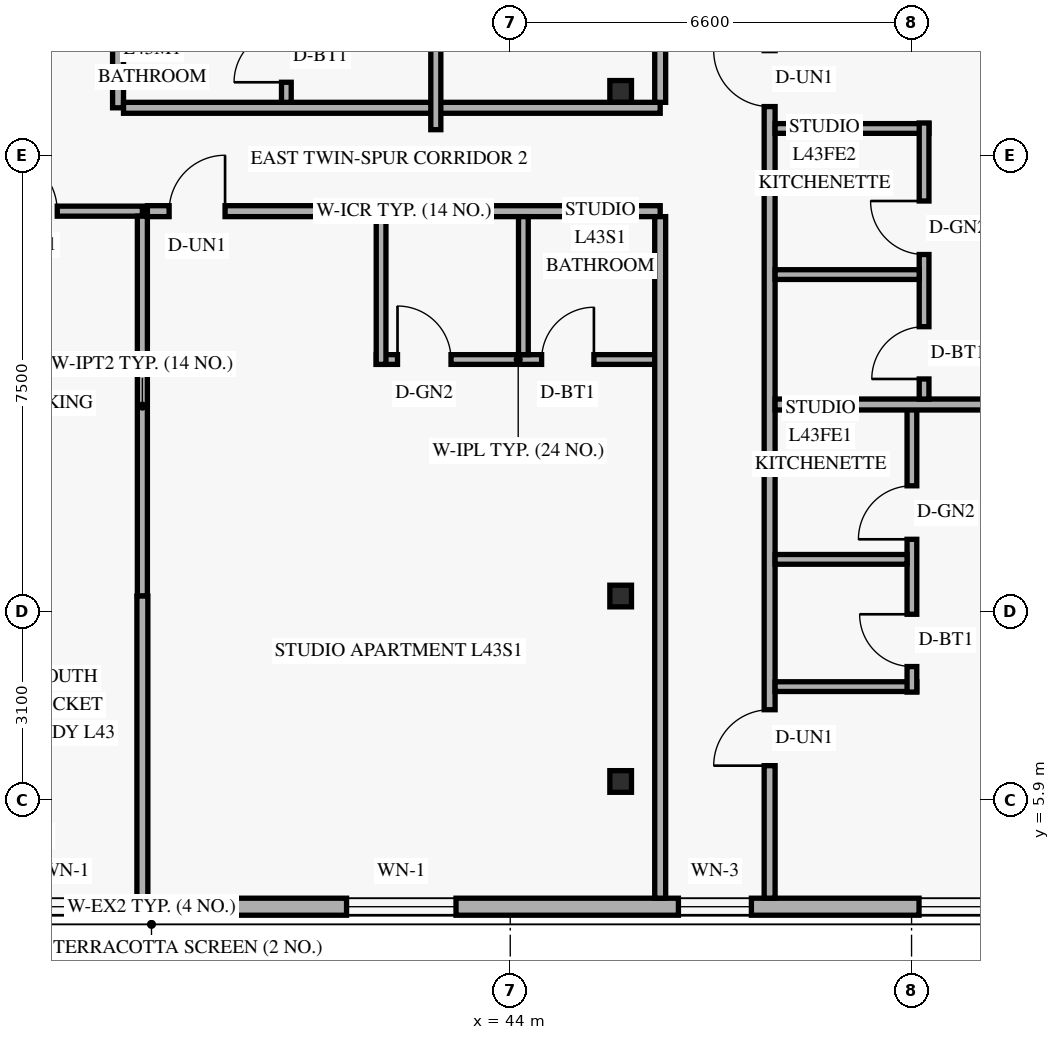
"""IFC4 building model, lengths in metres.
Left out: names, types, materials, properties, quantities, classifications, styles, units other than length and angle.
Written with IfcOpenShell. Run it as: python <this file> out.ifc"""

import sys

from ifc_helpers import new_model, si_unit, direction, frame, frame_2d, origin, origin_2d, place, context, subcontext, project, spatial, rectangle, hollow_rectangle, extrude, element, fill, save


model = new_model("IFC4")
c1 = context("Model", 3, precision=1e-05, world=origin(), true_north=direction((0.0, 1.0)))
c2 = subcontext(c1, "Body", "Model", "MODEL_VIEW")
j1 = project(units=[si_unit("LENGTHUNIT", "METRE"), si_unit("PLANEANGLEUNIT", "RADIAN")], contexts=[c1])
p1 = place(None, origin())
s1 = spatial("IfcSite", under=j1, at=p1, CompositionType="ELEMENT")
p2 = place(p1, origin())
s2 = spatial("IfcBuilding", under=s1, at=p2, CompositionType="ELEMENT")
p3 = place(p2, frame((0.0, 0.0, 166.2)))
s3 = spatial("IfcBuildingStorey", under=s2, at=p3, CompositionType="ELEMENT", Elevation=166.2)
for number, where, z_axis, x_axis in (
    (1, (45.753, 6.2, 0.0), (0.035, 0.0, 0.999), (0.0, 1.0, 0.0)),
    (2, (45.753, 9.25, 0.0), (0.035, 0.0, 0.999), (0.0, 1.0, 0.0)),
    (3, (45.753, 17.55, 0.0), (0.035, 0.0, 0.999), (0.0, 1.0, 0.0)),
):
    element("IfcColumn", number, at=place(p3, frame(where, z_axis=z_axis, x_axis=x_axis)), inside=s3, PredefinedType="COLUMN", context=c2, shape_type="SweptSolid", body=[
        extrude(hollow_rectangle(XDim=0.356, YDim=0.356, WallThickness=0.016, at=origin_2d()), origin(), (0.0, 0.0, 1.0), 3.602),
    ])
p4 = place(p3, frame((21.22, 4.14, 0.0), z_axis=(0.0, 0.0, 1.0), x_axis=(1.0, 0.0, 0.0)))
e4 = element("IfcWall", 4, at=p4, inside=s3, PredefinedType="SOLIDWALL", context=c2, shape_type="SweptSolid", body=[
    extrude(rectangle(XDim=33.76, YDim=0.28, at=frame_2d((16.88, 0.0))), origin(), (0.0, 0.0, 1.0), 3.36),
])
p5 = place(p4, frame((2.255, 0.0, 0.85)))
e5 = element("IfcOpeningElement", 5, at=p5, cuts=e4, PredefinedType="OPENING", context=c2, shape_type="SweptSolid", body=[
    extrude(rectangle(XDim=1.8, YDim=1.6, at=frame_2d((0.9, 0.8))), frame((0.0, 0.15, 0.0), z_axis=(0.0, -1.0, 0.0), x_axis=(1.0, 0.0, 0.0)), (0.0, 0.0, 1.0), 0.3),
])
p6 = place(p4, frame((9.14, 0.0, 0.85)))
e6 = element("IfcOpeningElement", 6, at=p6, cuts=e4, PredefinedType="OPENING", context=c2, shape_type="SweptSolid", body=[
    extrude(rectangle(XDim=1.8, YDim=1.6, at=frame_2d((0.9, 0.8))), frame((0.0, 0.15, 0.0), z_axis=(0.0, -1.0, 0.0), x_axis=(1.0, 0.0, 0.0)), (0.0, 0.0, 1.0), 0.3),
])
p7 = place(p4, frame((14.565, 0.0, 0.85)))
e7 = element("IfcOpeningElement", 7, at=p7, cuts=e4, PredefinedType="OPENING", context=c2, shape_type="SweptSolid", body=[
    extrude(rectangle(XDim=1.8, YDim=1.6, at=frame_2d((0.9, 0.8))), frame((0.0, 0.15, 0.0), z_axis=(0.0, -1.0, 0.0), x_axis=(1.0, 0.0, 0.0)), (0.0, 0.0, 1.0), 0.3),
])
p8 = place(p4, frame((20.088, 0.0, 0.85)))
e8 = element("IfcOpeningElement", 8, at=p8, cuts=e4, PredefinedType="OPENING", context=c2, shape_type="SweptSolid", body=[
    extrude(rectangle(XDim=1.8, YDim=1.6, at=frame_2d((0.9, 0.8))), frame((0.0, 0.15, 0.0), z_axis=(0.0, -1.0, 0.0), x_axis=(1.0, 0.0, 0.0)), (0.0, 0.0, 1.0), 0.3),
])
p9 = place(p4, frame((25.546, 0.0, 0.85)))
e9 = element("IfcOpeningElement", 9, at=p9, cuts=e4, PredefinedType="OPENING", context=c2, shape_type="SweptSolid", body=[
    extrude(rectangle(XDim=1.2, YDim=1.5, at=frame_2d((0.6, 0.75))), frame((0.0, 0.15, 0.0), z_axis=(0.0, -1.0, 0.0), x_axis=(1.0, 0.0, 0.0)), (0.0, 0.0, 1.0), 0.3),
])
p10 = place(p4, frame((29.503, 0.0, 0.85)))
e10 = element("IfcOpeningElement", 10, at=p10, cuts=e4, PredefinedType="OPENING", context=c2, shape_type="SweptSolid", body=[
    extrude(rectangle(XDim=1.8, YDim=1.6, at=frame_2d((0.9, 0.8))), frame((0.0, 0.15, 0.0), z_axis=(0.0, -1.0, 0.0), x_axis=(1.0, 0.0, 0.0)), (0.0, 0.0, 1.0), 0.3),
])
p11 = place(p3, frame((32.732, 15.58, 0.0), z_axis=(0.0, 0.0, 1.0), x_axis=(1.0, 0.0, 0.0)))
e11 = element("IfcWall", 11, at=p11, inside=s3, PredefinedType="PARTITIONING", context=c2, shape_type="SweptSolid", body=[
    extrude(rectangle(XDim=5.218, YDim=0.165, at=frame_2d((2.609, 0.0))), origin(), (0.0, 0.0, 1.0), 2.73),
])
p12 = place(p11, frame((2.867, 0.0, 0.0)))
e12 = element("IfcOpeningElement", 12, at=p12, cuts=e11, PredefinedType="OPENING", context=c2, shape_type="SweptSolid", body=[
    extrude(rectangle(XDim=0.95, YDim=2.15, at=frame_2d((0.475, 1.075))), frame((0.0, 0.093, 0.0), z_axis=(0.0, -1.0, 0.0), x_axis=(1.0, 0.0, 0.0)), (0.0, 0.0, 1.0), 0.185),
])
p13 = place(p3, frame((37.95, 9.25, 0.0), z_axis=(0.0, 0.0, 1.0), x_axis=(0.0, 1.0, 0.0)))
e13 = element("IfcWall", 13, at=p13, inside=s3, PredefinedType="PARTITIONING", context=c2, shape_type="SweptSolid", body=[
    extrude(rectangle(XDim=6.248, YDim=0.165, at=frame_2d((3.124, 0.0))), origin(), (0.0, 0.0, 1.0), 2.73),
])
p14 = place(p3, frame((37.55, 17.28, 0.0), z_axis=(0.0, 0.0, 1.0), x_axis=(0.0, 1.0, 0.0)))
e14 = element("IfcWall", 14, at=p14, inside=s3, PredefinedType="STANDARD", context=c2, shape_type="SweptSolid", body=[
    extrude(rectangle(XDim=10.28, YDim=0.18, at=frame_2d((5.14, 0.0))), origin(), (0.0, 0.0, 1.0), 2.73),
])
p15 = place(p14, frame((5.0, 0.0, 0.0)))
e15 = element("IfcOpeningElement", 15, at=p15, cuts=e14, PredefinedType="OPENING", context=c2, shape_type="SweptSolid", body=[
    extrude(rectangle(XDim=0.92, YDim=2.15, at=frame_2d((0.46, 1.075))), frame((0.0, 0.1, 0.0), z_axis=(0.0, -1.0, 0.0), x_axis=(1.0, 0.0, 0.0)), (0.0, 0.0, 1.0), 0.2),
])
p16 = place(p3, frame((38.032, 15.58, 0.0), z_axis=(0.0, 0.0, 1.0), x_axis=(1.0, 0.0, 0.0)))
e16 = element("IfcWall", 16, at=p16, inside=s3, PredefinedType="STANDARD", context=c2, shape_type="SweptSolid", body=[
    extrude(rectangle(XDim=8.434, YDim=0.18, at=frame_2d((4.217, 0.0))), origin(), (0.0, 0.0, 1.0), 2.73),
])
p17 = place(p16, frame((0.357, 0.0, 0.0)))
e17 = element("IfcOpeningElement", 17, at=p17, cuts=e16, PredefinedType="OPENING", context=c2, shape_type="SweptSolid", body=[
    extrude(rectangle(XDim=0.92, YDim=2.15, at=frame_2d((0.46, 1.075))), frame((0.0, 0.1, 0.0), z_axis=(0.0, -1.0, 0.0), x_axis=(1.0, 0.0, 0.0)), (0.0, 0.0, 1.0), 0.2),
])
p18 = place(p3, frame((37.64, 17.28, 0.0), z_axis=(0.0, 0.0, 1.0), x_axis=(1.0, 0.0, 0.0)))
e18 = element("IfcWall", 18, at=p18, inside=s3, PredefinedType="STANDARD", context=c2, shape_type="SweptSolid", body=[
    extrude(rectangle(XDim=8.826, YDim=0.18, at=frame_2d((4.413, 0.0))), origin(), (0.0, 0.0, 1.0), 2.73),
])
p19 = place(p3, frame((37.95, 4.28, 0.0), z_axis=(0.0, 0.0, 1.0), x_axis=(0.0, 1.0, 0.0)))
e19 = element("IfcWall", 19, at=p19, inside=s3, PredefinedType="PARTITIONING", context=c2, shape_type="SweptSolid", body=[
    extrude(rectangle(XDim=4.97, YDim=0.18, at=frame_2d((2.485, 0.0))), origin(), (0.0, 0.0, 1.0), 2.73),
])
p20 = place(p3, frame((41.796, 13.14, 0.0), z_axis=(0.0, 0.0, 1.0), x_axis=(1.0, 0.0, 0.0)))
e20 = element("IfcWall", 20, at=p20, inside=s3, PredefinedType="PLUMBINGWALL", context=c2, shape_type="SweptSolid", body=[
    extrude(rectangle(XDim=4.67, YDim=0.16, at=frame_2d((2.335, 0.0))), origin(), (0.0, 0.0, 1.0), 2.73),
])
p21 = place(p20, frame((0.35, 0.0, 0.0)))
e21 = element("IfcOpeningElement", 21, at=p21, cuts=e20, PredefinedType="OPENING", context=c2, shape_type="SweptSolid", body=[
    extrude(rectangle(XDim=0.88, YDim=2.12, at=frame_2d((0.44, 1.06))), frame((0.0, 0.09, 0.0), z_axis=(0.0, -1.0, 0.0), x_axis=(1.0, 0.0, 0.0)), (0.0, 0.0, 1.0), 0.18),
])
p22 = place(p20, frame((2.72, 0.0, 0.0)))
e22 = element("IfcOpeningElement", 22, at=p22, cuts=e20, PredefinedType="OPENING", context=c2, shape_type="SweptSolid", body=[
    extrude(rectangle(XDim=0.86, YDim=2.12, at=frame_2d((0.43, 1.06))), frame((0.0, 0.09, 0.0), z_axis=(0.0, -1.0, 0.0), x_axis=(1.0, 0.0, 0.0)), (0.0, 0.0, 1.0), 0.18),
])
p23 = place(p3, frame((41.876, 13.06, 0.0), z_axis=(0.0, 0.0, 1.0), x_axis=(0.0, 1.0, 0.0)))
e23 = element("IfcWall", 23, at=p23, inside=s3, PredefinedType="PLUMBINGWALL", context=c2, shape_type="SweptSolid", body=[
    extrude(rectangle(XDim=2.43, YDim=0.16, at=frame_2d((1.215, 0.0))), origin(), (0.0, 0.0, 1.0), 2.984),
])
p24 = place(p3, frame((44.216, 13.22, 0.0), z_axis=(0.0, 0.0, 1.0), x_axis=(0.0, 1.0, 0.0)))
e24 = element("IfcWall", 24, at=p24, inside=s3, PredefinedType="PLUMBINGWALL", context=c2, shape_type="SweptSolid", body=[
    extrude(rectangle(XDim=2.27, YDim=0.16, at=frame_2d((1.135, 0.0))), origin(), (0.0, 0.0, 1.0), 2.984),
])
p25 = place(p3, frame((40.318, 17.37, 0.0), z_axis=(0.0, 0.0, 1.0), x_axis=(0.0, 1.0, 0.0)))
e25 = element("IfcWall", 25, at=p25, inside=s3, PredefinedType="PLUMBINGWALL", context=c2, shape_type="SweptSolid", body=[
    extrude(rectangle(XDim=4.64, YDim=0.16, at=frame_2d((2.32, 0.0))), origin(), (0.0, 0.0, 1.0), 2.73),
])
p26 = place(p25, frame((0.33, 0.0, 0.0)))
e26 = element("IfcOpeningElement", 26, at=p26, cuts=e25, PredefinedType="OPENING", context=c2, shape_type="SweptSolid", body=[
    extrude(rectangle(XDim=0.86, YDim=2.12, at=frame_2d((0.43, 1.06))), frame((0.0, 0.09, 0.0), z_axis=(0.0, -1.0, 0.0), x_axis=(1.0, 0.0, 0.0)), (0.0, 0.0, 1.0), 0.18),
])
p27 = place(p25, frame((2.423, 0.0, 0.0)))
e27 = element("IfcOpeningElement", 27, at=p27, cuts=e25, PredefinedType="OPENING", context=c2, shape_type="SweptSolid", body=[
    extrude(rectangle(XDim=0.88, YDim=2.12, at=frame_2d((0.44, 1.06))), frame((0.0, 0.09, 0.0), z_axis=(0.0, -1.0, 0.0), x_axis=(1.0, 0.0, 0.0)), (0.0, 0.0, 1.0), 0.18),
])
p28 = place(p3, frame((42.776, 16.92, 0.0), z_axis=(0.0, 0.0, 1.0), x_axis=(0.0, 1.0, 0.0)))
e28 = element("IfcWall", 28, at=p28, inside=s3, PredefinedType="PARTITIONING", context=c2, shape_type="SweptSolid", body=[
    extrude(rectangle(XDim=6.25, YDim=0.165, at=frame_2d((3.125, 0.0))), origin(), (0.0, 0.0, 1.0), 2.73),
])
p29 = place(p3, frame((48.266, 4.28, 0.0), z_axis=(0.0, 0.0, 1.0), x_axis=(0.0, 1.0, 0.0)))
e29 = element("IfcWall", 29, at=p29, inside=s3, PredefinedType="STANDARD", context=c2, shape_type="SweptSolid", body=[
    extrude(rectangle(XDim=39.44, YDim=0.18, at=frame_2d((19.72, 0.0))), origin(), (0.0, 0.0, 1.0), 2.73),
])
p30 = place(p29, frame((2.18, 0.0, 0.0)))
e30 = element("IfcOpeningElement", 30, at=p30, cuts=e29, PredefinedType="OPENING", context=c2, shape_type="SweptSolid", body=[
    extrude(rectangle(XDim=0.92, YDim=2.15, at=frame_2d((0.46, 1.075))), frame((0.0, 0.1, 0.0), z_axis=(0.0, -1.0, 0.0), x_axis=(1.0, 0.0, 0.0)), (0.0, 0.0, 1.0), 0.2),
])
p31 = place(p29, frame((13.02, 0.0, 0.0)))
e31 = element("IfcOpeningElement", 31, at=p31, cuts=e29, PredefinedType="OPENING", context=c2, shape_type="SweptSolid", body=[
    extrude(rectangle(XDim=0.92, YDim=2.15, at=frame_2d((0.46, 1.075))), frame((0.0, 0.1, 0.0), z_axis=(0.0, -1.0, 0.0), x_axis=(1.0, 0.0, 0.0)), (0.0, 0.0, 1.0), 0.2),
])
p32 = place(p29, frame((22.32, 0.0, 0.0)))
e32 = element("IfcOpeningElement", 32, at=p32, cuts=e29, PredefinedType="OPENING", context=c2, shape_type="SweptSolid", body=[
    extrude(rectangle(XDim=0.92, YDim=2.15, at=frame_2d((0.46, 1.075))), frame((0.0, 0.1, 0.0), z_axis=(0.0, -1.0, 0.0), x_axis=(1.0, 0.0, 0.0)), (0.0, 0.0, 1.0), 0.2),
])
p33 = place(p29, frame((32.12, 0.0, 0.0)))
e33 = element("IfcOpeningElement", 33, at=p33, cuts=e29, PredefinedType="OPENING", context=c2, shape_type="SweptSolid", body=[
    extrude(rectangle(XDim=0.92, YDim=2.15, at=frame_2d((0.46, 1.075))), frame((0.0, 0.1, 0.0), z_axis=(0.0, -1.0, 0.0), x_axis=(1.0, 0.0, 0.0)), (0.0, 0.0, 1.0), 0.2),
])
p34 = place(p29, frame((38.2, 0.0, 0.0)))
e34 = element("IfcOpeningElement", 34, at=p34, cuts=e29, PredefinedType="OPENING", context=c2, shape_type="SweptSolid", body=[
    extrude(rectangle(XDim=0.92, YDim=2.15, at=frame_2d((0.46, 1.075))), frame((0.0, 0.1, 0.0), z_axis=(0.0, -1.0, 0.0), x_axis=(1.0, 0.0, 0.0)), (0.0, 0.0, 1.0), 0.2),
])
p35 = place(p3, frame((46.466, 4.28, 0.0), z_axis=(0.0, 0.0, 1.0), x_axis=(0.0, 1.0, 0.0)))
e35 = element("IfcWall", 35, at=p35, inside=s3, PredefinedType="STANDARD", context=c2, shape_type="SweptSolid", body=[
    extrude(rectangle(XDim=11.21, YDim=0.18, at=frame_2d((5.605, 0.0))), origin(), (0.0, 0.0, 1.0), 2.73),
])
p36 = place(p3, frame((46.466, 17.37, 0.0), z_axis=(0.0, 0.0, 1.0), x_axis=(0.0, 1.0, 0.0)))
e36 = element("IfcWall", 36, at=p36, inside=s3, PredefinedType="STANDARD", context=c2, shape_type="SweptSolid", body=[
    extrude(rectangle(XDim=10.1, YDim=0.18, at=frame_2d((5.05, 0.0))), origin(), (0.0, 0.0, 1.0), 2.73),
])
p37 = place(p3, frame((48.356, 7.76, 0.0), z_axis=(0.0, 0.0, 1.0), x_axis=(1.0, 0.0, 0.0)))
e37 = element("IfcWall", 37, at=p37, inside=s3, PredefinedType="PLUMBINGWALL", context=c2, shape_type="SweptSolid", body=[
    extrude(rectangle(XDim=2.33, YDim=0.16, at=frame_2d((1.165, 0.0))), origin(), (0.0, 0.0, 1.0), 3.36),
])
p38 = place(p3, frame((50.606, 7.67, 0.0), z_axis=(0.0, 0.0, 1.0), x_axis=(0.0, 1.0, 0.0)))
e38 = element("IfcWall", 38, at=p38, inside=s3, PredefinedType="PLUMBINGWALL", context=c2, shape_type="SweptSolid", body=[
    extrude(rectangle(XDim=4.73, YDim=0.16, at=frame_2d((2.365, 0.0))), origin(), (0.0, 0.0, 1.0), 2.73),
])
p39 = place(p38, frame((0.42, 0.0, 0.0)))
e39 = element("IfcOpeningElement", 39, at=p39, cuts=e38, PredefinedType="OPENING", context=c2, shape_type="SweptSolid", body=[
    extrude(rectangle(XDim=0.86, YDim=2.12, at=frame_2d((0.43, 1.06))), frame((0.0, 0.09, 0.0), z_axis=(0.0, -1.0, 0.0), x_axis=(1.0, 0.0, 0.0)), (0.0, 0.0, 1.0), 0.18),
])
p40 = place(p38, frame((2.513, 0.0, 0.0)))
e40 = element("IfcOpeningElement", 40, at=p40, cuts=e38, PredefinedType="OPENING", context=c2, shape_type="SweptSolid", body=[
    extrude(rectangle(XDim=0.88, YDim=2.12, at=frame_2d((0.44, 1.06))), frame((0.0, 0.09, 0.0), z_axis=(0.0, -1.0, 0.0), x_axis=(1.0, 0.0, 0.0)), (0.0, 0.0, 1.0), 0.18),
])
p41 = place(p3, frame((48.356, 9.853, 0.0), z_axis=(0.0, 0.0, 1.0), x_axis=(1.0, 0.0, 0.0)))
e41 = element("IfcWall", 41, at=p41, inside=s3, PredefinedType="PLUMBINGWALL", context=c2, shape_type="SweptSolid", body=[
    extrude(rectangle(XDim=2.17, YDim=0.16, at=frame_2d((1.085, 0.0))), origin(), (0.0, 0.0, 1.0), 3.36),
])
p42 = place(p3, frame((48.356, 12.4, 0.0), z_axis=(0.0, 0.0, 1.0), x_axis=(1.0, 0.0, 0.0)))
e42 = element("IfcWall", 42, at=p42, inside=s3, PredefinedType="PARTITIONING", context=c2, shape_type="SweptSolid", body=[
    extrude(rectangle(XDim=9.964, YDim=0.18, at=frame_2d((4.982, 0.0))), origin(), (0.0, 0.0, 1.0), 2.879),
])
p43 = place(p3, frame((48.356, 16.94, 0.0), z_axis=(0.0, 0.0, 1.0), x_axis=(1.0, 0.0, 0.0)))
e43 = element("IfcWall", 43, at=p43, inside=s3, PredefinedType="PLUMBINGWALL", context=c2, shape_type="SweptSolid", body=[
    extrude(rectangle(XDim=2.53, YDim=0.16, at=frame_2d((1.265, 0.0))), origin(), (0.0, 0.0, 1.0), 3.36),
])
p44 = place(p3, frame((50.806, 12.49, 0.0), z_axis=(0.0, 0.0, 1.0), x_axis=(0.0, 1.0, 0.0)))
e44 = element("IfcWall", 44, at=p44, inside=s3, PredefinedType="PLUMBINGWALL", context=c2, shape_type="SweptSolid", body=[
    extrude(rectangle(XDim=4.54, YDim=0.16, at=frame_2d((2.27, 0.0))), origin(), (0.0, 0.0, 1.0), 2.984),
])
p45 = place(p44, frame((0.33, 0.0, 0.0)))
e45 = element("IfcOpeningElement", 45, at=p45, cuts=e44, PredefinedType="OPENING", context=c2, shape_type="SweptSolid", body=[
    extrude(rectangle(XDim=0.86, YDim=2.12, at=frame_2d((0.43, 1.06))), frame((0.0, 0.09, 0.0), z_axis=(0.0, -1.0, 0.0), x_axis=(1.0, 0.0, 0.0)), (0.0, 0.0, 1.0), 0.18),
])
p46 = place(p44, frame((2.377, 0.0, 0.0)))
e46 = element("IfcOpeningElement", 46, at=p46, cuts=e44, PredefinedType="OPENING", context=c2, shape_type="SweptSolid", body=[
    extrude(rectangle(XDim=0.88, YDim=2.12, at=frame_2d((0.44, 1.06))), frame((0.0, 0.09, 0.0), z_axis=(0.0, -1.0, 0.0), x_axis=(1.0, 0.0, 0.0)), (0.0, 0.0, 1.0), 0.18),
])
p47 = place(p3, frame((48.356, 14.537, 0.0), z_axis=(0.0, 0.0, 1.0), x_axis=(1.0, 0.0, 0.0)))
e47 = element("IfcWall", 47, at=p47, inside=s3, PredefinedType="PLUMBINGWALL", context=c2, shape_type="SweptSolid", body=[
    extrude(rectangle(XDim=2.37, YDim=0.16, at=frame_2d((1.185, 0.0))), origin(), (0.0, 0.0, 1.0), 3.36),
])
p48 = place(p7, origin())
e48 = element("IfcWindow", 48, at=p48, inside=s3, PartitioningType="SINGLE_PANEL", PredefinedType="WINDOW", context=c2, shape_type="SweptSolid", body=[
    extrude(rectangle(XDim=1.8, YDim=1.6, at=frame_2d((0.9, 0.8))), frame((0.0, 0.03, 0.0), z_axis=(0.0, -1.0, 0.0), x_axis=(1.0, 0.0, 0.0)), (0.0, 0.0, 1.0), 0.06),
])
fill(e7, e48)
p49 = place(p8, origin())
e49 = element("IfcWindow", 49, at=p49, inside=s3, PartitioningType="SINGLE_PANEL", PredefinedType="WINDOW", context=c2, shape_type="SweptSolid", body=[
    extrude(rectangle(XDim=1.8, YDim=1.6, at=frame_2d((0.9, 0.8))), frame((0.0, 0.03, 0.0), z_axis=(0.0, -1.0, 0.0), x_axis=(1.0, 0.0, 0.0)), (0.0, 0.0, 1.0), 0.06),
])
fill(e8, e49)
p50 = place(p9, origin())
e50 = element("IfcWindow", 50, at=p50, inside=s3, PartitioningType="SINGLE_PANEL", PredefinedType="WINDOW", context=c2, shape_type="SweptSolid", body=[
    extrude(rectangle(XDim=1.2, YDim=1.5, at=frame_2d((0.6, 0.75))), frame((0.0, 0.03, 0.0), z_axis=(0.0, -1.0, 0.0), x_axis=(1.0, 0.0, 0.0)), (0.0, 0.0, 1.0), 0.06),
])
fill(e9, e50)
p51 = place(p10, origin())
e51 = element("IfcWindow", 51, at=p51, inside=s3, PartitioningType="SINGLE_PANEL", PredefinedType="WINDOW", context=c2, shape_type="SweptSolid", body=[
    extrude(rectangle(XDim=1.8, YDim=1.6, at=frame_2d((0.9, 0.8))), frame((0.0, 0.03, 0.0), z_axis=(0.0, -1.0, 0.0), x_axis=(1.0, 0.0, 0.0)), (0.0, 0.0, 1.0), 0.06),
])
fill(e10, e51)
p52 = place(p12, origin())
e52 = element("IfcDoor", 52, at=p52, inside=s3, OperationType="SINGLE_SWING_LEFT", PredefinedType="DOOR", context=c2, shape_type="SweptSolid", body=[
    extrude(rectangle(XDim=0.95, YDim=2.15, at=frame_2d((0.475, 1.075))), frame((0.0, 0.025, 0.0), z_axis=(0.0, -1.0, 0.0), x_axis=(1.0, 0.0, 0.0)), (0.0, 0.0, 1.0), 0.05),
])
fill(e12, e52)
p53 = place(p17, origin())
e53 = element("IfcDoor", 53, at=p53, inside=s3, OperationType="SINGLE_SWING_RIGHT", PredefinedType="DOOR", context=c2, shape_type="SweptSolid", body=[
    extrude(rectangle(XDim=0.92, YDim=2.15, at=frame_2d((0.46, 1.075))), frame((0.0, 0.025, 0.0), z_axis=(0.0, -1.0, 0.0), x_axis=(1.0, 0.0, 0.0)), (0.0, 0.0, 1.0), 0.05),
])
fill(e17, e53)
p54 = place(p21, origin())
e54 = element("IfcDoor", 54, at=p54, inside=s3, OperationType="SINGLE_SWING_LEFT", PredefinedType="DOOR", context=c2, shape_type="SweptSolid", body=[
    extrude(rectangle(XDim=0.88, YDim=2.12, at=frame_2d((0.44, 1.06))), frame((0.0, 0.025, 0.0), z_axis=(0.0, -1.0, 0.0), x_axis=(1.0, 0.0, 0.0)), (0.0, 0.0, 1.0), 0.05),
])
fill(e21, e54)
p55 = place(p22, origin())
e55 = element("IfcDoor", 55, at=p55, inside=s3, OperationType="SINGLE_SWING_RIGHT", PredefinedType="DOOR", context=c2, shape_type="SweptSolid", body=[
    extrude(rectangle(XDim=0.86, YDim=2.12, at=frame_2d((0.43, 1.06))), frame((0.0, 0.025, 0.0), z_axis=(0.0, -1.0, 0.0), x_axis=(1.0, 0.0, 0.0)), (0.0, 0.0, 1.0), 0.05),
])
fill(e22, e55)
p56 = place(p26, origin())
e56 = element("IfcDoor", 56, at=p56, inside=s3, OperationType="SINGLE_SWING_LEFT", PredefinedType="DOOR", context=c2, shape_type="SweptSolid", body=[
    extrude(rectangle(XDim=0.86, YDim=2.12, at=frame_2d((0.43, 1.06))), frame((0.0, 0.025, 0.0), z_axis=(0.0, -1.0, 0.0), x_axis=(1.0, 0.0, 0.0)), (0.0, 0.0, 1.0), 0.05),
])
fill(e26, e56)
p57 = place(p30, origin())
e57 = element("IfcDoor", 57, at=p57, inside=s3, OperationType="SINGLE_SWING_LEFT", PredefinedType="DOOR", context=c2, shape_type="SweptSolid", body=[
    extrude(rectangle(XDim=0.92, YDim=2.15, at=frame_2d((0.46, 1.075))), frame((0.0, 0.025, 0.0), z_axis=(0.0, -1.0, 0.0), x_axis=(1.0, 0.0, 0.0)), (0.0, 0.0, 1.0), 0.05),
])
fill(e30, e57)
p58 = place(p39, origin())
e58 = element("IfcDoor", 58, at=p58, inside=s3, OperationType="SINGLE_SWING_RIGHT", PredefinedType="DOOR", context=c2, shape_type="SweptSolid", body=[
    extrude(rectangle(XDim=0.86, YDim=2.12, at=frame_2d((0.43, 1.06))), frame((0.0, 0.025, 0.0), z_axis=(0.0, -1.0, 0.0), x_axis=(1.0, 0.0, 0.0)), (0.0, 0.0, 1.0), 0.05),
])
fill(e39, e58)
p59 = place(p40, origin())
e59 = element("IfcDoor", 59, at=p59, inside=s3, OperationType="SINGLE_SWING_LEFT", PredefinedType="DOOR", context=c2, shape_type="SweptSolid", body=[
    extrude(rectangle(XDim=0.88, YDim=2.12, at=frame_2d((0.44, 1.06))), frame((0.0, 0.025, 0.0), z_axis=(0.0, -1.0, 0.0), x_axis=(1.0, 0.0, 0.0)), (0.0, 0.0, 1.0), 0.05),
])
fill(e40, e59)
p60 = place(p31, origin())
e60 = element("IfcDoor", 60, at=p60, inside=s3, OperationType="SINGLE_SWING_RIGHT", PredefinedType="DOOR", context=c2, shape_type="SweptSolid", body=[
    extrude(rectangle(XDim=0.92, YDim=2.15, at=frame_2d((0.46, 1.075))), frame((0.0, 0.025, 0.0), z_axis=(0.0, -1.0, 0.0), x_axis=(1.0, 0.0, 0.0)), (0.0, 0.0, 1.0), 0.05),
])
fill(e31, e60)
p61 = place(p45, origin())
e61 = element("IfcDoor", 61, at=p61, inside=s3, OperationType="SINGLE_SWING_LEFT", PredefinedType="DOOR", context=c2, shape_type="SweptSolid", body=[
    extrude(rectangle(XDim=0.86, YDim=2.12, at=frame_2d((0.43, 1.06))), frame((0.0, 0.025, 0.0), z_axis=(0.0, -1.0, 0.0), x_axis=(1.0, 0.0, 0.0)), (0.0, 0.0, 1.0), 0.05),
])
fill(e45, e61)
p62 = place(p46, origin())
e62 = element("IfcDoor", 62, at=p62, inside=s3, OperationType="SINGLE_SWING_RIGHT", PredefinedType="DOOR", context=c2, shape_type="SweptSolid", body=[
    extrude(rectangle(XDim=0.88, YDim=2.12, at=frame_2d((0.44, 1.06))), frame((0.0, 0.025, 0.0), z_axis=(0.0, -1.0, 0.0), x_axis=(1.0, 0.0, 0.0)), (0.0, 0.0, 1.0), 0.05),
])
fill(e46, e62)
save(model, sys.argv[1])
